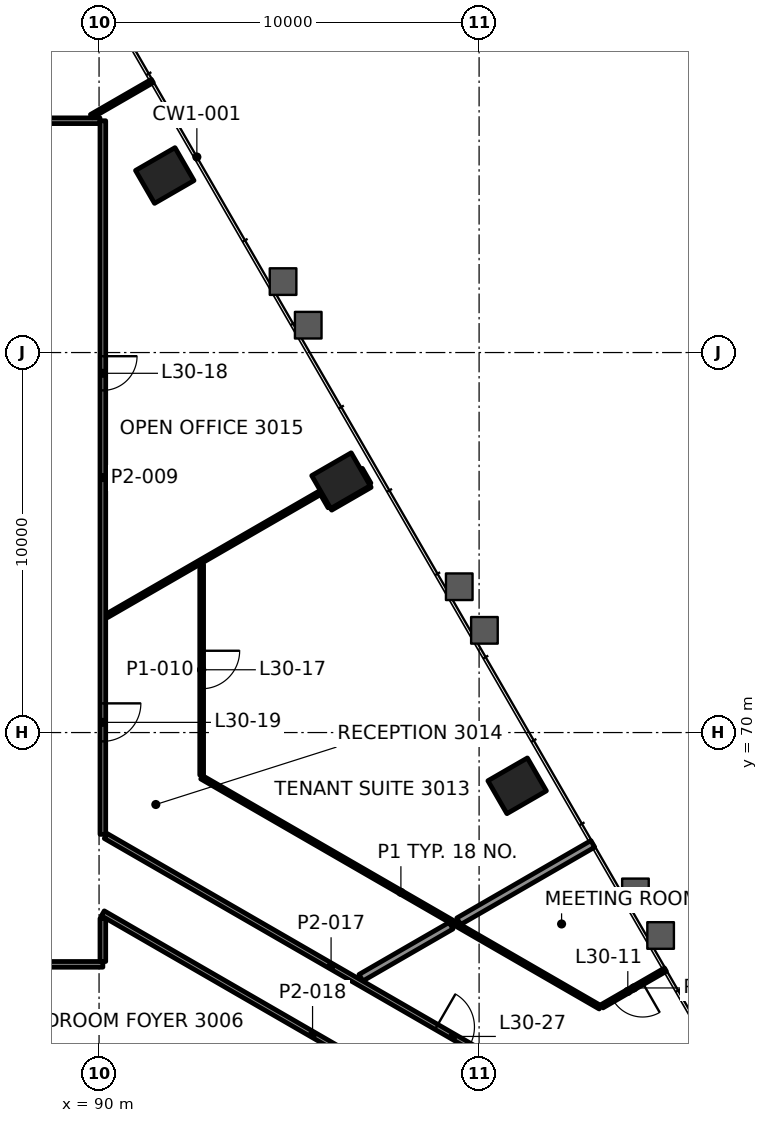
"""IFC4 building model, lengths in metres.
Left out: names, types, materials, properties, quantities, classifications, styles, units other than length and angle.
Written with IfcOpenShell. Run it as: python <this file> out.ifc"""

import sys

from ifc_helpers import new_model, si_unit, direction, frame, frame_2d, origin, origin_2d, place, context, subcontext, project, spatial, rectangle, extrude, element, fill, save


model = new_model("IFC4")
c1 = context("Model", 3, precision=1e-05, world=origin(), true_north=direction((0.0, 1.0)))
c2 = subcontext(c1, "Body", "Model", "MODEL_VIEW")
j1 = project(units=[si_unit("LENGTHUNIT", "METRE"), si_unit("PLANEANGLEUNIT", "RADIAN")], contexts=[c1])
p1 = place(None, origin())
s1 = spatial("IfcSite", under=j1, at=p1, CompositionType="ELEMENT")
p2 = place(p1, origin())
s2 = spatial("IfcBuilding", under=s1, at=p2, CompositionType="ELEMENT")
p3 = place(p2, frame((0.0, 0.0, 132.4)))
s3 = spatial("IfcBuildingStorey", under=s2, at=p3, CompositionType="ELEMENT", Elevation=132.4)
for number, where, z_axis, x_axis in (
    (1, (101.001, 68.598, -0.0), (0.0, 0.0, 1.0), (-0.5, 0.866, 0.0)),
    (2, (96.365, 76.628, -0.0), (0.0, 0.0, 1.0), (-0.5, 0.866, 0.0)),
    (3, (91.729, 84.658, -0.0), (0.0, 0.0, 1.0), (-0.5, 0.866, 0.0)),
):
    element("IfcColumn", number, at=place(p3, frame(where, z_axis=z_axis, x_axis=x_axis)), inside=s3, PredefinedType="COLUMN", context=c2, shape_type="SweptSolid", body=[
        extrude(rectangle(XDim=1.0, YDim=1.2, at=origin_2d()), origin(), (0.0, 0.0, 1.0), 4.2),
    ])
p4 = place(p3, frame((90.1, 63.9, 0.0), z_axis=(0.0, 0.0, 1.0), x_axis=(-1.0, 0.0, 0.0)))
e4 = element("IfcWall", 4, at=p4, inside=s3, PredefinedType="PARTITIONING", context=c2, shape_type="SweptSolid", body=[
    extrude(rectangle(XDim=30.2, YDim=0.15, at=frame_2d((15.1, 0.0))), origin(), (0.0, 0.0, 1.0), 3.4),
])
p5 = place(p4, frame((4.833, 0.0, 0.0)))
e5 = element("IfcOpeningElement", 5, at=p5, cuts=e4, PredefinedType="OPENING", context=c2, shape_type="SweptSolid", body=[
    extrude(rectangle(XDim=1.0, YDim=2.1, at=frame_2d((0.5, 1.05))), frame((0.0, 0.085, 0.0), z_axis=(0.0, -1.0, 0.0), x_axis=(1.0, 0.0, 0.0)), (0.0, 0.0, 1.0), 0.17),
])
p6 = place(p4, frame((18.077, 0.0, 0.0)))
e6 = element("IfcOpeningElement", 6, at=p6, cuts=e4, PredefinedType="OPENING", context=c2, shape_type="SweptSolid", body=[
    extrude(rectangle(XDim=1.0, YDim=2.1, at=frame_2d((0.5, 1.05))), frame((0.0, 0.085, 0.0), z_axis=(0.0, -1.0, 0.0), x_axis=(1.0, 0.0, 0.0)), (0.0, 0.0, 1.0), 0.17),
])
p7 = place(p4, frame((27.893, 0.0, 0.0)))
e7 = element("IfcOpeningElement", 7, at=p7, cuts=e4, PredefinedType="OPENING", context=c2, shape_type="SweptSolid", body=[
    extrude(rectangle(XDim=0.9, YDim=2.1, at=frame_2d((0.45, 1.05))), frame((0.0, 0.085, 0.0), z_axis=(0.0, -1.0, 0.0), x_axis=(1.0, 0.0, 0.0)), (0.0, 0.0, 1.0), 0.17),
])
p8 = place(p3, frame((80.375, 86.1, 0.0), z_axis=(0.0, 0.0, 1.0), x_axis=(1.0, 0.0, 0.0)))
e8 = element("IfcWall", 8, at=p8, inside=s3, PredefinedType="PARTITIONING", context=c2, shape_type="SweptSolid", body=[
    extrude(rectangle(XDim=9.649, YDim=0.15, at=frame_2d((4.825, 0.0))), origin(), (0.0, 0.0, 1.0), 3.4),
])
p9 = place(p8, frame((4.11, 0.0, 0.0)))
e9 = element("IfcOpeningElement", 9, at=p9, cuts=e8, PredefinedType="OPENING", context=c2, shape_type="SweptSolid", body=[
    extrude(rectangle(XDim=1.2, YDim=2.1, at=frame_2d((0.6, 1.05))), frame((0.0, 0.085, 0.0), z_axis=(0.0, -1.0, 0.0), x_axis=(1.0, 0.0, 0.0)), (0.0, 0.0, 1.0), 0.17),
])
p10 = place(p3, frame((104.903, 63.761, 0.0), z_axis=(0.0, 0.0, 1.0), x_axis=(-0.86605048973, -0.49995654735, 0.0)))
e10 = element("IfcWall", 10, at=p10, inside=s3, PredefinedType="PARTITIONING", context=c2, shape_type="SweptSolid", body=[
    extrude(rectangle(XDim=1.926, YDim=0.1, at=frame_2d((0.963, 0.0))), origin(), (0.0, 0.0, 1.0), 3.4),
])
p11 = place(p10, frame((0.693, 0.0, 0.0)))
e11 = element("IfcOpeningElement", 11, at=p11, cuts=e10, PredefinedType="OPENING", context=c2, shape_type="SweptSolid", body=[
    extrude(rectangle(XDim=0.9, YDim=2.1, at=frame_2d((0.45, 1.05))), frame((0.0, 0.06, 0.0), z_axis=(0.0, -1.0, 0.0), x_axis=(1.0, 0.0, 0.0)), (0.0, 0.0, 1.0), 0.12),
])
p12 = place(p3, frame((96.89, 63.548, 0.0), z_axis=(0.0, 0.0, 1.0), x_axis=(0.86604168154, 0.499971805041, 0.0)))
e12 = element("IfcWall", 12, at=p12, inside=s3, PredefinedType="PARTITIONING", context=c2, shape_type="SweptSolid", body=[
    extrude(rectangle(XDim=2.74, YDim=0.2, at=frame_2d((1.37, 0.0))), origin(), (0.0, 0.0, 1.0), 3.4),
])
p13 = place(p3, frame((96.096, 75.896, 0.0), z_axis=(0.0, 0.0, 1.0), x_axis=(0.865978732077, 0.500080829057, 0.0)))
e13 = element("IfcWall", 13, at=p13, inside=s3, PredefinedType="PARTITIONING", context=c2, shape_type="SweptSolid", body=[
    extrude(rectangle(XDim=1.199, YDim=0.1, at=frame_2d((0.6, 0.0))), origin(), (0.0, 0.0, 1.0), 3.165),
])
p14 = place(p3, frame((90.201, 73.07, 0.0), z_axis=(0.0, 0.0, 1.0), x_axis=(0.866021525041, 0.500006718121, 0.0)))
e14 = element("IfcWall", 14, at=p14, inside=s3, PredefinedType="PARTITIONING", context=c2, shape_type="SweptSolid", body=[
    extrude(rectangle(XDim=6.518, YDim=0.1, at=frame_2d((3.259, 0.0))), origin(), (0.0, 0.0, 1.0), 3.4),
])
p15 = place(p3, frame((89.797, 86.22, 0.0), z_axis=(0.0, 0.0, 1.0), x_axis=(0.866036320872, 0.499981090573, 0.0)))
e15 = element("IfcWall", 15, at=p15, inside=s3, PredefinedType="PARTITIONING", context=c2, shape_type="SweptSolid", body=[
    extrude(rectangle(XDim=1.852, YDim=0.1, at=frame_2d((0.926, 0.0))), origin(), (0.0, 0.0, 1.0), 3.165),
])
p16 = place(p3, frame((92.7, 74.425, 0.0), z_axis=(0.0, 0.0, 1.0), x_axis=(0.0, -1.0, 0.0)))
e16 = element("IfcWall", 16, at=p16, inside=s3, PredefinedType="PARTITIONING", context=c2, shape_type="SweptSolid", body=[
    extrude(rectangle(XDim=5.544, YDim=0.1, at=frame_2d((2.772, 0.0))), origin(), (0.0, 0.0, 1.0), 3.4),
])
p17 = place(p16, frame((2.272, 0.0, 0.0)))
e17 = element("IfcOpeningElement", 17, at=p17, cuts=e16, PredefinedType="OPENING", context=c2, shape_type="SweptSolid", body=[
    extrude(rectangle(XDim=1.0, YDim=2.1, at=frame_2d((0.5, 1.05))), frame((0.0, 0.06, 0.0), z_axis=(0.0, -1.0, 0.0), x_axis=(1.0, 0.0, 0.0)), (0.0, 0.0, 1.0), 0.12),
])
p18 = place(p3, frame((90.1, 63.975, 0.0), z_axis=(0.0, 0.0, 1.0), x_axis=(0.0, 1.0, 0.0)))
e18 = element("IfcWall", 18, at=p18, inside=s3, PredefinedType="PARTITIONING", context=c2, shape_type="SweptSolid", body=[
    extrude(rectangle(XDim=1.131, YDim=0.15, at=frame_2d((0.565, 0.0))), origin(), (0.0, 0.0, 1.0), 3.247),
])
p19 = place(p3, frame((90.1, 86.1, 0.0), z_axis=(0.0, 0.0, 1.0), x_axis=(0.0, -1.0, 0.0)))
e19 = element("IfcWall", 19, at=p19, inside=s3, PredefinedType="PARTITIONING", context=c2, shape_type="SweptSolid", body=[
    extrude(rectangle(XDim=18.778, YDim=0.15, at=frame_2d((9.389, 0.0))), origin(), (0.0, 0.0, 1.0), 3.4),
])
p20 = place(p19, frame((6.196, 0.0, 0.0)))
e20 = element("IfcOpeningElement", 20, at=p20, cuts=e19, PredefinedType="OPENING", context=c2, shape_type="SweptSolid", body=[
    extrude(rectangle(XDim=0.9, YDim=2.1, at=frame_2d((0.45, 1.05))), frame((0.0, 0.085, 0.0), z_axis=(0.0, -1.0, 0.0), x_axis=(1.0, 0.0, 0.0)), (0.0, 0.0, 1.0), 0.17),
])
p21 = place(p19, frame((15.332, 0.0, 0.0)))
e21 = element("IfcOpeningElement", 21, at=p21, cuts=e19, PredefinedType="OPENING", context=c2, shape_type="SweptSolid", body=[
    extrude(rectangle(XDim=1.0, YDim=2.1, at=frame_2d((0.5, 1.05))), frame((0.0, 0.085, 0.0), z_axis=(0.0, -1.0, 0.0), x_axis=(1.0, 0.0, 0.0)), (0.0, 0.0, 1.0), 0.17),
])
p22 = place(p3, frame((97.11, 76.539, 0.0), z_axis=(0.0, 0.0, 1.0), x_axis=(-0.500286647819, 0.865859844325, 0.0)))
e22 = element("IfcWall", 22, at=p22, inside=s3, PredefinedType="PARTITIONING", context=c2, shape_type="SweptSolid", body=[
    extrude(rectangle(XDim=0.449, YDim=0.1, at=frame_2d((0.225, 0.0))), origin(), (0.0, 0.0, 1.0), 3.4),
])
p23 = place(p3, frame((96.07, 75.939, 0.0), z_axis=(0.0, 0.0, 1.0), x_axis=(-0.50002266109, 0.866012320003, 0.0)))
e23 = element("IfcWall", 23, at=p23, inside=s3, PredefinedType="PARTITIONING", context=c2, shape_type="SweptSolid", body=[
    extrude(rectangle(XDim=0.399, YDim=0.1, at=frame_2d((0.199, 0.0))), origin(), (0.0, 0.0, 1.0), 3.4),
])
p24 = place(p3, frame((103.185, 62.769, 0.0), z_axis=(0.0, 0.0, 1.0), x_axis=(-0.866024396652, 0.5000017444, 0.0)))
e24 = element("IfcWall", 24, at=p24, inside=s3, PredefinedType="PARTITIONING", context=c2, shape_type="SweptSolid", body=[
    extrude(rectangle(XDim=12.107, YDim=0.1, at=frame_2d((6.053, 0.0))), origin(), (0.0, 0.0, 1.0), 3.4),
])
p25 = place(p3, frame((90.175, 67.278, 0.0), z_axis=(0.0, 0.0, 1.0), x_axis=(0.866022903348, -0.500004330858, 0.0)))
e25 = element("IfcWall", 25, at=p25, inside=s3, PredefinedType="PARTITIONING", context=c2, shape_type="SweptSolid", body=[
    extrude(rectangle(XDim=13.695, YDim=0.15, at=frame_2d((6.848, 0.0))), origin(), (0.0, 0.0, 1.0), 3.4),
])
p26 = place(p25, frame((10.05, 0.0, 0.0)))
e26 = element("IfcOpeningElement", 26, at=p26, cuts=e25, PredefinedType="OPENING", context=c2, shape_type="SweptSolid", body=[
    extrude(rectangle(XDim=1.0, YDim=2.1, at=frame_2d((0.5, 1.05))), frame((0.0, 0.085, 0.0), z_axis=(0.0, -1.0, 0.0), x_axis=(1.0, 0.0, 0.0)), (0.0, 0.0, 1.0), 0.17),
])
p27 = place(p3, frame((101.136, 58.871, 0.0), z_axis=(0.0, 0.0, 1.0), x_axis=(-0.866020317169, 0.500008810174, 0.0)))
e27 = element("IfcWall", 27, at=p27, inside=s3, PredefinedType="PARTITIONING", context=c2, shape_type="SweptSolid", body=[
    extrude(rectangle(XDim=12.743, YDim=0.15, at=frame_2d((6.372, 0.0))), origin(), (0.0, 0.0, 1.0), 3.247),
])
p28 = place(p27, frame((2.546, 0.0, 0.0)))
e28 = element("IfcOpeningElement", 28, at=p28, cuts=e27, PredefinedType="OPENING", context=c2, shape_type="SweptSolid", body=[
    extrude(rectangle(XDim=1.2, YDim=2.1, at=frame_2d((0.6, 1.05))), frame((0.0, 0.085, 0.0), z_axis=(0.0, -1.0, 0.0), x_axis=(1.0, 0.0, 0.0)), (0.0, 0.0, 1.0), 0.17),
])
p29 = place(p3, frame((99.463, 65.033, 0.0), z_axis=(0.0, 0.0, 1.0), x_axis=(0.866014978466, 0.500018056747, 0.0)))
e29 = element("IfcWall", 29, at=p29, inside=s3, PredefinedType="PARTITIONING", context=c2, shape_type="SweptSolid", body=[
    extrude(rectangle(XDim=4.075, YDim=0.2, at=frame_2d((2.038, 0.0))), origin(), (0.0, 0.0, 1.0), 3.4),
])
p30 = place(p11, origin())
e30 = element("IfcDoor", 30, at=p30, inside=s3, OperationType="SINGLE_SWING_RIGHT", PredefinedType="DOOR", context=c2, shape_type="SweptSolid", body=[
    extrude(rectangle(XDim=0.9, YDim=2.1, at=frame_2d((0.45, 1.05))), frame((0.0, 0.025, 0.0), z_axis=(0.0, -1.0, 0.0), x_axis=(1.0, 0.0, 0.0)), (0.0, 0.0, 1.0), 0.05),
])
fill(e11, e30)
p31 = place(p17, origin())
e31 = element("IfcDoor", 31, at=p31, inside=s3, OperationType="SINGLE_SWING_LEFT", PredefinedType="DOOR", context=c2, shape_type="SweptSolid", body=[
    extrude(rectangle(XDim=1.0, YDim=2.1, at=frame_2d((0.5, 1.05))), frame((0.0, 0.025, 0.0), z_axis=(0.0, -1.0, 0.0), x_axis=(1.0, 0.0, 0.0)), (0.0, 0.0, 1.0), 0.05),
])
fill(e17, e31)
p32 = place(p20, origin())
e32 = element("IfcDoor", 32, at=p32, inside=s3, OperationType="SINGLE_SWING_LEFT", PredefinedType="DOOR", context=c2, shape_type="SweptSolid", body=[
    extrude(rectangle(XDim=0.9, YDim=2.1, at=frame_2d((0.45, 1.05))), frame((0.0, 0.025, 0.0), z_axis=(0.0, -1.0, 0.0), x_axis=(1.0, 0.0, 0.0)), (0.0, 0.0, 1.0), 0.05),
])
fill(e20, e32)
p33 = place(p21, origin())
e33 = element("IfcDoor", 33, at=p33, inside=s3, OperationType="SINGLE_SWING_RIGHT", PredefinedType="DOOR", context=c2, shape_type="SweptSolid", body=[
    extrude(rectangle(XDim=1.0, YDim=2.1, at=frame_2d((0.5, 1.05))), frame((0.0, 0.025, 0.0), z_axis=(0.0, -1.0, 0.0), x_axis=(1.0, 0.0, 0.0)), (0.0, 0.0, 1.0), 0.05),
])
fill(e21, e33)
p34 = place(p26, origin())
e34 = element("IfcDoor", 34, at=p34, inside=s3, OperationType="SINGLE_SWING_LEFT", PredefinedType="DOOR", context=c2, shape_type="SweptSolid", body=[
    extrude(rectangle(XDim=1.0, YDim=2.1, at=frame_2d((0.5, 1.05))), frame((0.0, 0.025, 0.0), z_axis=(0.0, -1.0, 0.0), x_axis=(1.0, 0.0, 0.0)), (0.0, 0.0, 1.0), 0.05),
])
fill(e26, e34)
save(model, sys.argv[1])
